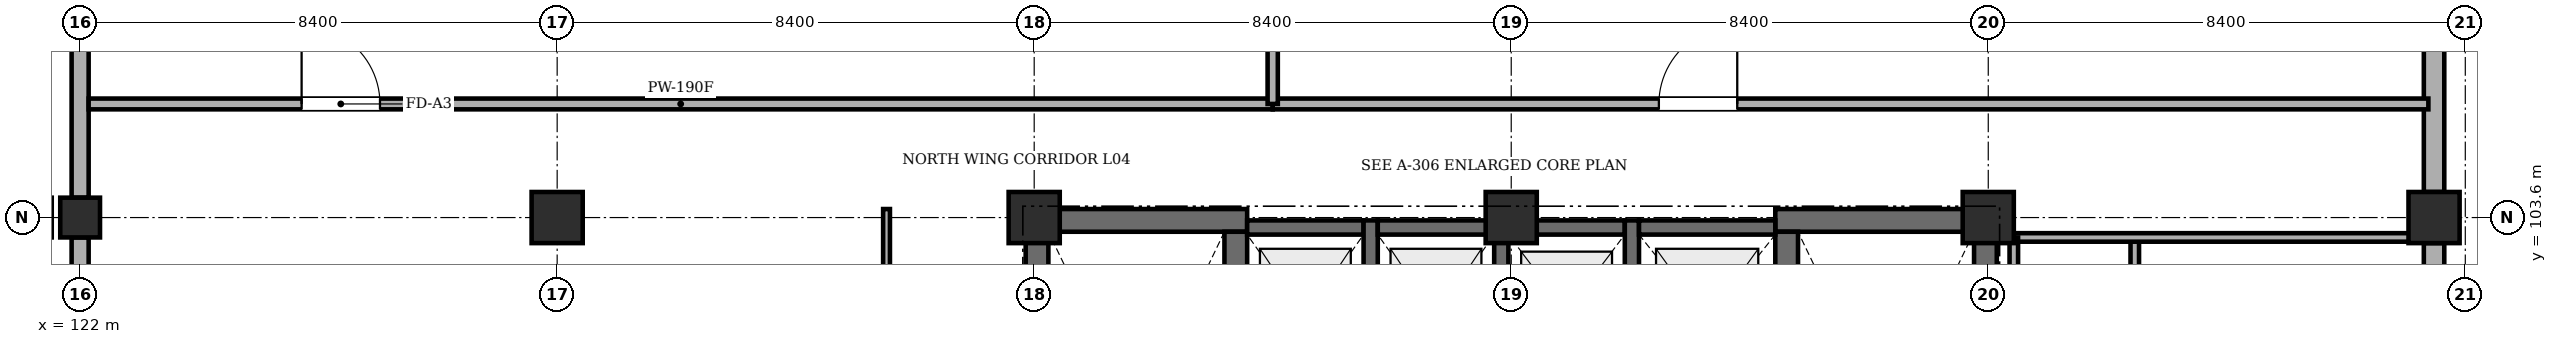
"""IFC4 building model, lengths in metres.
Left out: names, types, materials, properties, quantities, classifications, styles, units other than length and angle.
Written with IfcOpenShell. Run it as: python <this file> out.ifc"""

import sys

from ifc_helpers import new_model, si_unit, direction, frame, frame_2d, origin, origin_2d, place, context, subcontext, project, spatial, rectangle, extrude, element, fill, save


model = new_model("IFC4")
c1 = context("Model", 3, precision=1e-05, world=origin(), true_north=direction((0.0, 1.0)))
c2 = subcontext(c1, "Body", "Model", "MODEL_VIEW")
j1 = project(units=[si_unit("LENGTHUNIT", "METRE"), si_unit("PLANEANGLEUNIT", "RADIAN")], contexts=[c1])
p1 = place(None, origin())
s1 = spatial("IfcSite", under=j1, at=p1, CompositionType="ELEMENT")
p2 = place(p1, origin())
s2 = spatial("IfcBuilding", under=s1, at=p2, CompositionType="ELEMENT")
p3 = place(p2, frame((0.0, 0.0, 14.7)))
s3 = spatial("IfcBuildingStorey", under=s2, at=p3, CompositionType="ELEMENT", Elevation=14.7)
p4 = place(p3, frame((122.0, 103.6, 0.0), z_axis=(0.0, 0.0, 1.0), x_axis=(1.0, 0.0, 0.0)))
e1 = element("IfcColumn", 1, at=p4, inside=s3, PredefinedType="COLUMN", context=c2, shape_type="SweptSolid", body=[
    extrude(rectangle(XDim=0.7, YDim=0.7, at=origin_2d()), origin(), (0.0, 0.0, 1.0), 4.26),
])
for number, where, z_axis, x_axis in (
    (2, (130.4, 103.6, 0.0), (0.0, 0.0, 1.0), (1.0, 0.0, 0.0)),
    (3, (138.8, 103.6, 0.0), (0.0, 0.0, 1.0), (1.0, 0.0, 0.0)),
    (4, (147.2, 103.6, 0.0), (0.0, 0.0, 1.0), (1.0, 0.0, 0.0)),
    (5, (155.6, 103.6, 0.0), (0.0, 0.0, 1.0), (1.0, 0.0, 0.0)),
    (6, (163.45, 103.6, 0.0), (0.0, 0.0, 1.0), (1.0, 0.0, 0.0)),
):
    element("IfcColumn", number, at=place(p3, frame(where, z_axis=z_axis, x_axis=x_axis)), inside=s3, PredefinedType="COLUMN", context=c2, shape_type="SweptSolid", body=[
        extrude(rectangle(XDim=0.9, YDim=0.9, at=origin_2d()), origin(), (0.0, 0.0, 1.0), 4.26),
    ])
p5 = place(p3, frame((138.65, 103.55, 0.0), z_axis=(0.0, 0.0, 1.0), x_axis=(1.0, 0.0, 0.0)))
e7 = element("IfcWall", 7, at=p5, inside=s3, PredefinedType="SHEAR", context=c2, shape_type="SweptSolid", body=[
    extrude(rectangle(XDim=3.9, YDim=0.4, at=frame_2d((1.95, 0.0))), origin(), (0.0, 0.0, 1.0), 4.26),
])
p6 = place(p3, frame((138.85, 95.45, 0.0), z_axis=(0.0, 0.0, 1.0), x_axis=(0.0, 1.0, 0.0)))
e8 = element("IfcWall", 8, at=p6, inside=s3, PredefinedType="SHEAR", context=c2, shape_type="SweptSolid", body=[
    extrude(rectangle(XDim=7.9, YDim=0.4, at=frame_2d((3.95, 0.0))), origin(), (0.0, 0.0, 1.0), 4.26),
])
p7 = place(p3, frame((142.35, 95.45, 0.0), z_axis=(0.0, 0.0, 1.0), x_axis=(0.0, 1.0, 0.0)))
e9 = element("IfcWall", 9, at=p7, inside=s3, PredefinedType="SHEAR", context=c2, shape_type="SweptSolid", body=[
    extrude(rectangle(XDim=7.9, YDim=0.4, at=frame_2d((3.95, 0.0))), origin(), (0.0, 0.0, 1.0), 4.26),
])
p8 = place(p7, frame((0.22, 0.0, 0.0)))
e10 = element("IfcOpeningElement", 10, at=p8, cuts=e9, PredefinedType="OPENING", context=c2, shape_type="SweptSolid", body=[
    extrude(rectangle(XDim=1.15, YDim=2.15, at=frame_2d((0.575, 1.075))), frame((0.0, 0.21, 0.0), z_axis=(0.0, -1.0, 0.0), x_axis=(1.0, 0.0, 0.0)), (0.0, 0.0, 1.0), 0.42),
])
p9 = place(p3, frame((151.85, 103.55, 0.0), z_axis=(0.0, 0.0, 1.0), x_axis=(1.0, 0.0, 0.0)))
e11 = element("IfcWall", 11, at=p9, inside=s3, PredefinedType="SHEAR", context=c2, shape_type="SweptSolid", body=[
    extrude(rectangle(XDim=3.9, YDim=0.4, at=frame_2d((1.95, 0.0))), origin(), (0.0, 0.0, 1.0), 4.26),
])
p10 = place(p3, frame((152.05, 95.45, 0.0), z_axis=(0.0, 0.0, 1.0), x_axis=(0.0, 1.0, 0.0)))
e12 = element("IfcWall", 12, at=p10, inside=s3, PredefinedType="SHEAR", context=c2, shape_type="SweptSolid", body=[
    extrude(rectangle(XDim=7.9, YDim=0.4, at=frame_2d((3.95, 0.0))), origin(), (0.0, 0.0, 1.0), 4.26),
])
p11 = place(p10, frame((0.35, 0.0, 0.0)))
e13 = element("IfcOpeningElement", 13, at=p11, cuts=e12, PredefinedType="OPENING", context=c2, shape_type="SweptSolid", body=[
    extrude(rectangle(XDim=1.15, YDim=2.15, at=frame_2d((0.575, 1.075))), frame((0.0, 0.21, 0.0), z_axis=(0.0, -1.0, 0.0), x_axis=(1.0, 0.0, 0.0)), (0.0, 0.0, 1.0), 0.42),
])
p12 = place(p3, frame((155.55, 95.45, 0.0), z_axis=(0.0, 0.0, 1.0), x_axis=(0.0, 1.0, 0.0)))
e14 = element("IfcWall", 14, at=p12, inside=s3, PredefinedType="SHEAR", context=c2, shape_type="SweptSolid", body=[
    extrude(rectangle(XDim=7.9, YDim=0.4, at=frame_2d((3.95, 0.0))), origin(), (0.0, 0.0, 1.0), 4.26),
])
p13 = place(p3, frame((142.55, 103.425, 0.0), z_axis=(0.0, 0.0, 1.0), x_axis=(1.0, 0.0, 0.0)))
e15 = element("IfcWall", 15, at=p13, inside=s3, PredefinedType="SHEAR", context=c2, shape_type="SweptSolid", body=[
    extrude(rectangle(XDim=2.05, YDim=0.25, at=frame_2d((1.025, 0.0))), origin(), (0.0, 0.0, 1.0), 4.26),
])
p14 = place(p3, frame((144.725, 100.15, 0.0), z_axis=(0.0, 0.0, 1.0), x_axis=(0.0, 1.0, 0.0)))
e16 = element("IfcWall", 16, at=p14, inside=s3, PredefinedType="SHEAR", context=c2, shape_type="SweptSolid", body=[
    extrude(rectangle(XDim=3.4, YDim=0.25, at=frame_2d((1.7, 0.0))), origin(), (0.0, 0.0, 1.0), 4.26),
])
p15 = place(p3, frame((144.85, 103.425, 0.0), z_axis=(0.0, 0.0, 1.0), x_axis=(1.0, 0.0, 0.0)))
e17 = element("IfcWall", 17, at=p15, inside=s3, PredefinedType="SHEAR", context=c2, shape_type="SweptSolid", body=[
    extrude(rectangle(XDim=2.05, YDim=0.25, at=frame_2d((1.025, 0.0))), origin(), (0.0, 0.0, 1.0), 4.26),
])
p16 = place(p3, frame((147.025, 100.15, 0.0), z_axis=(0.0, 0.0, 1.0), x_axis=(0.0, 1.0, 0.0)))
e18 = element("IfcWall", 18, at=p16, inside=s3, PredefinedType="SHEAR", context=c2, shape_type="SweptSolid", body=[
    extrude(rectangle(XDim=3.4, YDim=0.25, at=frame_2d((1.7, 0.0))), origin(), (0.0, 0.0, 1.0), 4.26),
])
p17 = place(p3, frame((147.15, 103.425, 0.0), z_axis=(0.0, 0.0, 1.0), x_axis=(1.0, 0.0, 0.0)))
e19 = element("IfcWall", 19, at=p17, inside=s3, PredefinedType="SHEAR", context=c2, shape_type="SweptSolid", body=[
    extrude(rectangle(XDim=2.05, YDim=0.25, at=frame_2d((1.025, 0.0))), origin(), (0.0, 0.0, 1.0), 4.26),
])
p18 = place(p3, frame((149.325, 100.35, 0.0), z_axis=(0.0, 0.0, 1.0), x_axis=(0.0, 1.0, 0.0)))
e20 = element("IfcWall", 20, at=p18, inside=s3, PredefinedType="SHEAR", context=c2, shape_type="SweptSolid", body=[
    extrude(rectangle(XDim=3.2, YDim=0.25, at=frame_2d((1.6, 0.0))), origin(), (0.0, 0.0, 1.0), 4.26),
])
p19 = place(p3, frame((149.45, 103.425, 0.0), z_axis=(0.0, 0.0, 1.0), x_axis=(1.0, 0.0, 0.0)))
e21 = element("IfcWall", 21, at=p19, inside=s3, PredefinedType="SHEAR", context=c2, shape_type="SweptSolid", body=[
    extrude(rectangle(XDim=2.4, YDim=0.25, at=frame_2d((1.2, 0.0))), origin(), (0.0, 0.0, 1.0), 4.26),
])
p20 = place(p3, frame((163.45, 103.15, 0.0), z_axis=(0.0, 0.0, 1.0), x_axis=(0.0, -1.0, 0.0)))
e22 = element("IfcWall", 22, at=p20, inside=s3, PredefinedType="STANDARD", context=c2, shape_type="SweptSolid", body=[
    extrude(rectangle(XDim=7.5, YDim=0.36, at=frame_2d((3.75, 0.0))), origin(), (0.0, 0.0, 1.0), 3.56),
])
p21 = place(p20, frame((1.15, 0.0, 1.1)))
e23 = element("IfcOpeningElement", 23, at=p21, cuts=e22, PredefinedType="OPENING", context=c2, shape_type="SweptSolid", body=[
    extrude(rectangle(XDim=1.4, YDim=1.4, at=frame_2d((0.7, 0.7))), frame((0.0, 0.19, 0.0), z_axis=(0.0, -1.0, 0.0), x_axis=(1.0, 0.0, 0.0)), (0.0, 0.0, 1.0), 0.38),
])
p22 = place(p3, frame((163.45, 111.0, 0.0), z_axis=(0.0, 0.0, 1.0), x_axis=(0.0, -1.0, 0.0)))
e24 = element("IfcWall", 24, at=p22, inside=s3, PredefinedType="STANDARD", context=c2, shape_type="SweptSolid", body=[
    extrude(rectangle(XDim=6.95, YDim=0.36, at=frame_2d((3.475, 0.0))), origin(), (0.0, 0.0, 1.0), 3.56),
])
p23 = place(p22, frame((1.15, 0.0, 1.1)))
e25 = element("IfcOpeningElement", 25, at=p23, cuts=e24, PredefinedType="OPENING", context=c2, shape_type="SweptSolid", body=[
    extrude(rectangle(XDim=1.8, YDim=1.8, at=frame_2d((0.9, 0.9))), frame((0.0, 0.19, 0.0), z_axis=(0.0, -1.0, 0.0), x_axis=(1.0, 0.0, 0.0)), (0.0, 0.0, 1.0), 0.38),
])
p24 = place(p3, frame((122.0, 95.55, 0.0), z_axis=(0.0, 0.0, 1.0), x_axis=(0.0, 1.0, 0.0)))
e26 = element("IfcWall", 26, at=p24, inside=s3, PredefinedType="STANDARD", context=c2, shape_type="SweptSolid", body=[
    extrude(rectangle(XDim=7.7, YDim=0.3, at=frame_2d((3.85, 0.0))), origin(), (0.0, 0.0, 1.0), 3.51),
])
p25 = place(p3, frame((122.0, 103.95, 0.0), z_axis=(0.0, 0.0, 1.0), x_axis=(0.0, 1.0, 0.0)))
e27 = element("IfcWall", 27, at=p25, inside=s3, PredefinedType="STANDARD", context=c2, shape_type="SweptSolid", body=[
    extrude(rectangle(XDim=7.15, YDim=0.3, at=frame_2d((3.575, 0.0))), origin(), (0.0, 0.0, 1.0), 3.51),
])
p26 = place(p3, frame((158.18, 94.68, 0.0), z_axis=(0.0, 0.0, 1.0), x_axis=(0.0, 1.0, 0.0)))
e28 = element("IfcWall", 28, at=p26, inside=s3, PredefinedType="PARTITIONING", context=c2, shape_type="SweptSolid", body=[
    extrude(rectangle(XDim=8.57, YDim=0.15, at=frame_2d((4.285, 0.0))), origin(), (0.0, 0.0, 1.0), 4.26),
])
p27 = place(p26, frame((0.8, 0.0, 0.0)))
e29 = element("IfcOpeningElement", 29, at=p27, cuts=e28, PredefinedType="OPENING", context=c2, shape_type="SweptSolid", body=[
    extrude(rectangle(XDim=1.0, YDim=2.12, at=frame_2d((0.5, 1.06))), frame((0.0, 0.085, 0.0), z_axis=(0.0, -1.0, 0.0), x_axis=(1.0, 0.0, 0.0)), (0.0, 0.0, 1.0), 0.17),
])
p28 = place(p26, frame((3.5, 0.0, 0.0)))
e30 = element("IfcOpeningElement", 30, at=p28, cuts=e28, PredefinedType="OPENING", context=c2, shape_type="SweptSolid", body=[
    extrude(rectangle(XDim=0.92, YDim=2.1, at=frame_2d((0.46, 1.05))), frame((0.0, 0.085, 0.0), z_axis=(0.0, -1.0, 0.0), x_axis=(1.0, 0.0, 0.0)), (0.0, 0.0, 1.0), 0.17),
])
p29 = place(p26, frame((6.4, 0.0, 0.0)))
e31 = element("IfcOpeningElement", 31, at=p29, cuts=e28, PredefinedType="OPENING", context=c2, shape_type="SweptSolid", body=[
    extrude(rectangle(XDim=0.92, YDim=2.1, at=frame_2d((0.46, 1.05))), frame((0.0, 0.085, 0.0), z_axis=(0.0, -1.0, 0.0), x_axis=(1.0, 0.0, 0.0)), (0.0, 0.0, 1.0), 0.17),
])
p30 = place(p3, frame((156.05, 103.25, 0.0), z_axis=(0.0, 0.0, 1.0), x_axis=(1.0, 0.0, 0.0)))
e32 = element("IfcWall", 32, at=p30, inside=s3, PredefinedType="PARTITIONING", context=c2, shape_type="SweptSolid", body=[
    extrude(rectangle(XDim=7.15, YDim=0.15, at=frame_2d((3.575, 0.0))), origin(), (0.0, 0.0, 1.0), 4.26),
])
p31 = place(p3, frame((156.05, 94.68, 0.0), z_axis=(0.0, 0.0, 1.0), x_axis=(0.0, 1.0, 0.0)))
e33 = element("IfcWall", 33, at=p31, inside=s3, PredefinedType="PARTITIONING", context=c2, shape_type="SweptSolid", body=[
    extrude(rectangle(XDim=8.57, YDim=0.15, at=frame_2d((4.285, 0.0))), origin(), (0.0, 0.0, 1.0), 4.26),
])
p32 = place(p3, frame((136.2, 94.68, 0.0), z_axis=(0.0, 0.0, 1.0), x_axis=(0.0, 1.0, 0.0)))
e34 = element("IfcWall", 34, at=p32, inside=s3, PredefinedType="PARTITIONING", context=c2, shape_type="SweptSolid", body=[
    extrude(rectangle(XDim=9.07, YDim=0.12, at=frame_2d((4.535, 0.0))), origin(), (0.0, 0.0, 1.0), 4.26),
])
p33 = place(p3, frame((122.15, 105.6, 0.0), z_axis=(0.0, 0.0, 1.0), x_axis=(1.0, 0.0, 0.0)))
e35 = element("IfcWall", 35, at=p33, inside=s3, PredefinedType="SOLIDWALL", context=c2, shape_type="SweptSolid", body=[
    extrude(rectangle(XDim=20.85, YDim=0.19, at=frame_2d((10.425, 0.0))), origin(), (0.0, 0.0, 1.0), 4.26),
])
p34 = place(p33, frame((3.75, 0.0, 0.0)))
e36 = element("IfcOpeningElement", 36, at=p34, cuts=e35, PredefinedType="OPENING", context=c2, shape_type="SweptSolid", body=[
    extrude(rectangle(XDim=1.38, YDim=2.22, at=frame_2d((0.69, 1.11))), frame((0.0, 0.105, 0.0), z_axis=(0.0, -1.0, 0.0), x_axis=(1.0, 0.0, 0.0)), (0.0, 0.0, 1.0), 0.21),
])
p35 = place(p3, frame((143.0, 105.6, 0.0), z_axis=(0.0, 0.0, 1.0), x_axis=(1.0, 0.0, 0.0)))
e37 = element("IfcWall", 37, at=p35, inside=s3, PredefinedType="SOLIDWALL", context=c2, shape_type="SweptSolid", body=[
    extrude(rectangle(XDim=20.35, YDim=0.19, at=frame_2d((10.175, 0.0))), origin(), (0.0, 0.0, 1.0), 4.26),
])
p36 = place(p35, frame((6.8, 0.0, 0.0)))
e38 = element("IfcOpeningElement", 38, at=p36, cuts=e37, PredefinedType="OPENING", context=c2, shape_type="SweptSolid", body=[
    extrude(rectangle(XDim=1.38, YDim=2.22, at=frame_2d((0.69, 1.11))), frame((0.0, 0.105, 0.0), z_axis=(0.0, -1.0, 0.0), x_axis=(1.0, 0.0, 0.0)), (0.0, 0.0, 1.0), 0.21),
])
p37 = place(p3, frame((143.0, 105.6, 0.0), z_axis=(0.0, 0.0, 1.0), x_axis=(0.0, 1.0, 0.0)))
e39 = element("IfcWall", 39, at=p37, inside=s3, PredefinedType="STANDARD", context=c2, shape_type="SweptSolid", body=[
    extrude(rectangle(XDim=5.75, YDim=0.18, at=frame_2d((2.875, 0.0))), origin(), (0.0, 0.0, 1.0), 3.76),
])
p38 = place(p34, origin())
e40 = element("IfcDoor", 40, at=p38, inside=s3, OperationType="SINGLE_SWING_LEFT", PredefinedType="DOOR", context=c2, shape_type="SweptSolid", body=[
    extrude(rectangle(XDim=1.38, YDim=2.22, at=frame_2d((0.69, 1.11))), frame((0.0, 0.025, 0.0), z_axis=(0.0, -1.0, 0.0), x_axis=(1.0, 0.0, 0.0)), (0.0, 0.0, 1.0), 0.05),
])
fill(e36, e40)
p39 = place(p36, origin())
e41 = element("IfcDoor", 41, at=p39, inside=s3, OperationType="SINGLE_SWING_RIGHT", PredefinedType="DOOR", context=c2, shape_type="SweptSolid", body=[
    extrude(rectangle(XDim=1.38, YDim=2.22, at=frame_2d((0.69, 1.11))), frame((0.0, 0.025, 0.0), z_axis=(0.0, -1.0, 0.0), x_axis=(1.0, 0.0, 0.0)), (0.0, 0.0, 1.0), 0.05),
])
fill(e38, e41)
save(model, sys.argv[1])
